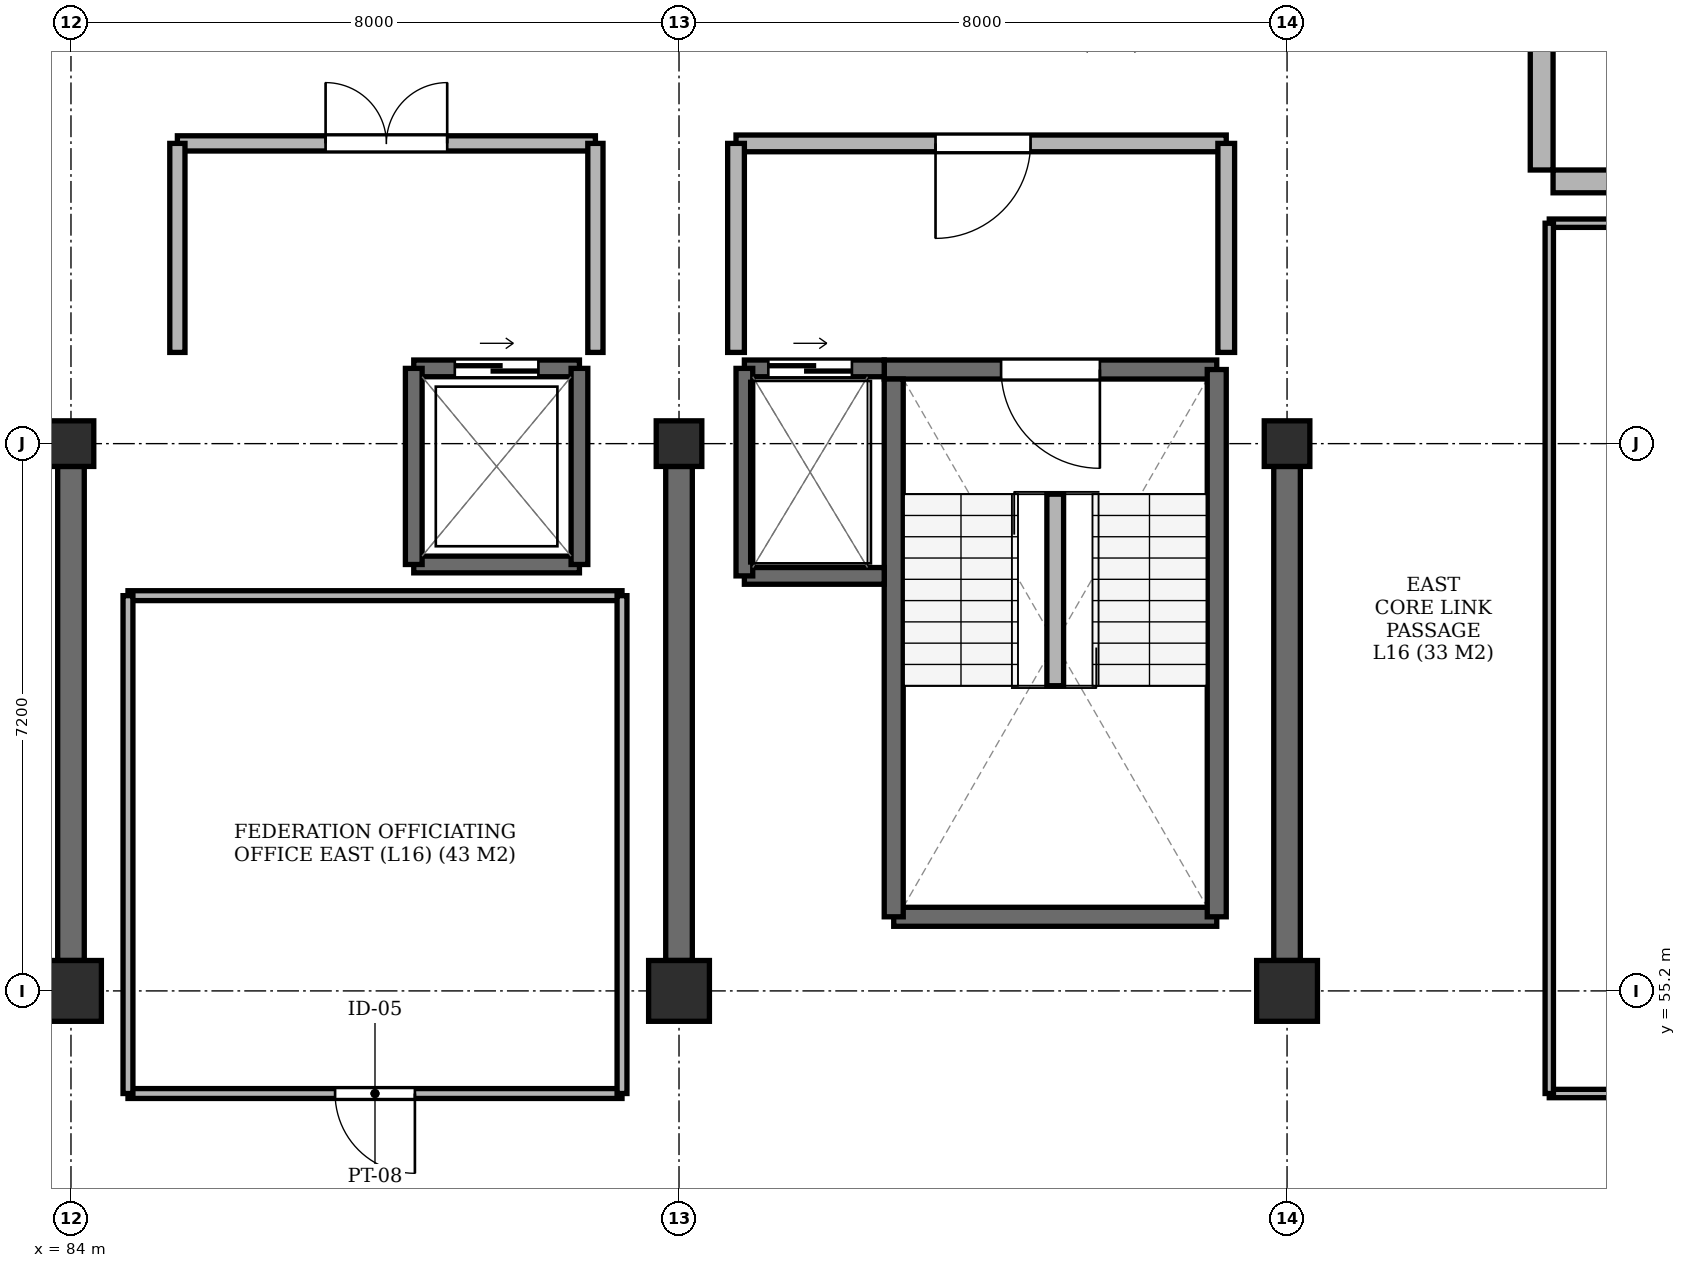
"""IFC4 building model, lengths in metres.
Left out: names, types, materials, properties, quantities, classifications, styles, units other than length and angle.
Written with IfcOpenShell. Run it as: python <this file> out.ifc"""

import sys

from ifc_helpers import new_model, si_unit, direction, frame, frame_2d, origin, origin_2d, place, context, subcontext, project, spatial, rectangle, extrude, element, fill, save


model = new_model("IFC4")
c1 = context("Model", 3, precision=1e-05, world=origin(), true_north=direction((0.0, 1.0)))
c2 = subcontext(c1, "Body", "Model", "MODEL_VIEW")
j1 = project(units=[si_unit("LENGTHUNIT", "METRE"), si_unit("PLANEANGLEUNIT", "RADIAN")], contexts=[c1])
p1 = place(None, origin())
s1 = spatial("IfcSite", under=j1, at=p1, CompositionType="ELEMENT")
p2 = place(p1, origin())
s2 = spatial("IfcBuilding", under=s1, at=p2, CompositionType="ELEMENT")
p3 = place(p2, frame((0.0, 0.0, 63.3)))
s3 = spatial("IfcBuildingStorey", under=s2, at=p3, CompositionType="ELEMENT", Elevation=63.3)
p4 = place(p3, frame((84.0, 55.2, -0.21), z_axis=(0.0, 0.0, 1.0), x_axis=(1.0, 0.0, 0.0)))
e1 = element("IfcColumn", 1, at=p4, inside=s3, PredefinedType="COLUMN", context=c2, shape_type="SweptSolid", body=[
    extrude(rectangle(XDim=0.8, YDim=0.8, at=origin_2d()), origin(), (0.0, 0.0, 1.0), 3.22),
])
p5 = place(p3, frame((84.0, 62.4, -0.21), z_axis=(0.0, 0.0, 1.0), x_axis=(1.0, 0.0, 0.0)))
e2 = element("IfcColumn", 2, at=p5, inside=s3, PredefinedType="COLUMN", context=c2, shape_type="SweptSolid", body=[
    extrude(rectangle(XDim=0.6, YDim=0.6, at=origin_2d()), origin(), (0.0, 0.0, 1.0), 3.22),
])
p6 = place(p3, frame((92.0, 55.2, -0.21), z_axis=(0.0, 0.0, 1.0), x_axis=(1.0, 0.0, 0.0)))
e3 = element("IfcColumn", 3, at=p6, inside=s3, PredefinedType="COLUMN", context=c2, shape_type="SweptSolid", body=[
    extrude(rectangle(XDim=0.8, YDim=0.8, at=origin_2d()), origin(), (0.0, 0.0, 1.0), 3.22),
])
p7 = place(p3, frame((92.0, 62.4, -0.21), z_axis=(0.0, 0.0, 1.0), x_axis=(1.0, 0.0, 0.0)))
e4 = element("IfcColumn", 4, at=p7, inside=s3, PredefinedType="COLUMN", context=c2, shape_type="SweptSolid", body=[
    extrude(rectangle(XDim=0.6, YDim=0.6, at=origin_2d()), origin(), (0.0, 0.0, 1.0), 3.22),
])
p8 = place(p3, frame((100.0, 55.2, -0.21), z_axis=(0.0, 0.0, 1.0), x_axis=(1.0, 0.0, 0.0)))
e5 = element("IfcColumn", 5, at=p8, inside=s3, PredefinedType="COLUMN", context=c2, shape_type="SweptSolid", body=[
    extrude(rectangle(XDim=0.8, YDim=0.8, at=origin_2d()), origin(), (0.0, 0.0, 1.0), 3.22),
])
p9 = place(p3, frame((100.0, 62.4, -0.21), z_axis=(0.0, 0.0, 1.0), x_axis=(1.0, 0.0, 0.0)))
e6 = element("IfcColumn", 6, at=p9, inside=s3, PredefinedType="COLUMN", context=c2, shape_type="SweptSolid", body=[
    extrude(rectangle(XDim=0.6, YDim=0.6, at=origin_2d()), origin(), (0.0, 0.0, 1.0), 3.22),
])
for number, where, z_axis, x_axis in (
    (7, (84.0, 55.6, 0.0), (0.0, 0.0, 1.0), (0.0, 1.0, 0.0)),
    (8, (92.0, 55.6, 0.0), (0.0, 0.0, 1.0), (0.0, 1.0, 0.0)),
    (9, (100.0, 55.6, 0.0), (0.0, 0.0, 1.0), (0.0, 1.0, 0.0)),
):
    element("IfcWall", number, at=place(p3, frame(where, z_axis=z_axis, x_axis=x_axis)), inside=s3, PredefinedType="SHEAR", context=c2, shape_type="SweptSolid", body=[
        extrude(rectangle(XDim=6.5, YDim=0.35, at=frame_2d((3.25, 0.0))), origin(), (0.0, 0.0, 1.0), 3.01),
    ])
p10 = place(p3, frame((108.0, 65.85, 0.0), z_axis=(0.0, 0.0, 1.0), x_axis=(-1.0, 0.0, 0.0)))
e10 = element("IfcWall", 10, at=p10, inside=s3, PredefinedType="SOLIDWALL", context=c2, shape_type="SweptSolid", body=[
    extrude(rectangle(XDim=4.5, YDim=0.3, at=frame_2d((2.25, 0.0))), origin(), (0.0, 0.0, 1.0), 2.53),
])
p11 = place(p10, frame((1.625, 0.0, 0.62)))
e11 = element("IfcOpeningElement", 11, at=p11, cuts=e10, PredefinedType="OPENING", context=c2, shape_type="SweptSolid", body=[
    extrude(rectangle(XDim=1.25, YDim=1.75, at=frame_2d((0.625, 0.875))), frame((0.0, 0.162, 0.0), z_axis=(0.0, -1.0, 0.0), x_axis=(1.0, 0.0, 0.0)), (0.0, 0.0, 1.0), 0.324),
])
p12 = place(p3, frame((103.35, 66.0, 0.0), z_axis=(0.0, 0.0, 1.0), x_axis=(0.0, 1.0, 0.0)))
e12 = element("IfcWall", 12, at=p12, inside=s3, PredefinedType="SOLIDWALL", context=c2, shape_type="SweptSolid", body=[
    extrude(rectangle(XDim=3.6, YDim=0.3, at=frame_2d((1.8, 0.0))), origin(), (0.0, 0.0, 1.0), 2.53),
])
p13 = place(p3, frame((94.825, 56.175, 0.0), z_axis=(0.0, 0.0, 1.0), x_axis=(1.0, 0.0, 0.0)))
e13 = element("IfcWall", 13, at=p13, inside=s3, PredefinedType="SHEAR", context=c2, shape_type="SweptSolid", body=[
    extrude(rectangle(XDim=4.25, YDim=0.25, at=frame_2d((2.125, 0.0))), origin(), (0.0, 0.0, 1.0), 3.01),
])
p14 = place(p3, frame((99.075, 63.375, 0.0), z_axis=(0.0, 0.0, 1.0), x_axis=(-1.0, 0.0, 0.0)))
e14 = element("IfcWall", 14, at=p14, inside=s3, PredefinedType="SHEAR", context=c2, shape_type="SweptSolid", body=[
    extrude(rectangle(XDim=4.375, YDim=0.25, at=frame_2d((2.188, 0.0))), origin(), (0.0, 0.0, 1.0), 3.01),
])
p15 = place(p14, frame((1.538, 0.0, 0.0)))
e15 = element("IfcOpeningElement", 15, at=p15, cuts=e14, PredefinedType="OPENING", context=c2, shape_type="SweptSolid", body=[
    extrude(rectangle(XDim=1.3, YDim=2.2, at=frame_2d((0.65, 1.1))), frame((0.0, 0.137, 0.0), z_axis=(0.0, -1.0, 0.0), x_axis=(1.0, 0.0, 0.0)), (0.0, 0.0, 1.0), 0.274),
])
p16 = place(p3, frame((94.825, 63.25, 0.0), z_axis=(0.0, 0.0, 1.0), x_axis=(0.0, -1.0, 0.0)))
e16 = element("IfcWall", 16, at=p16, inside=s3, PredefinedType="SHEAR", context=c2, shape_type="SweptSolid", body=[
    extrude(rectangle(XDim=7.075, YDim=0.25, at=frame_2d((3.538, 0.0))), origin(), (0.0, 0.0, 1.0), 3.01),
])
p17 = place(p3, frame((99.075, 56.175, 0.0), z_axis=(0.0, 0.0, 1.0), x_axis=(0.0, 1.0, 0.0)))
e17 = element("IfcWall", 17, at=p17, inside=s3, PredefinedType="SHEAR", context=c2, shape_type="SweptSolid", body=[
    extrude(rectangle(XDim=7.2, YDim=0.25, at=frame_2d((3.6, 0.0))), origin(), (0.0, 0.0, 1.0), 3.01),
])
p18 = place(p3, frame((96.95, 59.215, 0.0), z_axis=(0.0, 0.0, 1.0), x_axis=(0.0, 1.0, 0.0)))
e18 = element("IfcWall", 18, at=p18, inside=s3, PredefinedType="PARTITIONING", context=c2, shape_type="SweptSolid", body=[
    extrude(rectangle(XDim=2.52, YDim=0.22, at=frame_2d((1.26, 0.0))), origin(), (0.0, 0.0, 1.0), 3.01),
])
p19 = place(p3, frame((92.86, 60.66, 0.0), z_axis=(0.0, 0.0, 1.0), x_axis=(1.0, 0.0, 0.0)))
e19 = element("IfcWall", 19, at=p19, inside=s3, PredefinedType="SHEAR", context=c2, shape_type="SweptSolid", body=[
    extrude(rectangle(XDim=1.84, YDim=0.22, at=frame_2d((0.92, 0.0))), origin(), (0.0, 0.0, 1.0), 3.01),
])
p20 = place(p3, frame((94.7, 63.39, 0.0), z_axis=(0.0, 0.0, 1.0), x_axis=(-1.0, 0.0, 0.0)))
e20 = element("IfcWall", 20, at=p20, inside=s3, PredefinedType="SHEAR", context=c2, shape_type="SweptSolid", body=[
    extrude(rectangle(XDim=1.84, YDim=0.22, at=frame_2d((0.92, 0.0))), origin(), (0.0, 0.0, 1.0), 3.01),
])
p21 = place(p20, frame((0.425, 0.0, 0.0)))
e21 = element("IfcOpeningElement", 21, at=p21, cuts=e20, PredefinedType="OPENING", context=c2, shape_type="SweptSolid", body=[
    extrude(rectangle(XDim=1.1, YDim=2.2, at=frame_2d((0.55, 1.1))), frame((0.0, 0.122, 0.0), z_axis=(0.0, -1.0, 0.0), x_axis=(1.0, 0.0, 0.0)), (0.0, 0.0, 1.0), 0.244),
])
p22 = place(p3, frame((92.86, 63.39, 0.0), z_axis=(0.0, 0.0, 1.0), x_axis=(0.0, -1.0, 0.0)))
e22 = element("IfcWall", 22, at=p22, inside=s3, PredefinedType="SHEAR", context=c2, shape_type="SweptSolid", body=[
    extrude(rectangle(XDim=2.73, YDim=0.22, at=frame_2d((1.365, 0.0))), origin(), (0.0, 0.0, 1.0), 3.01),
])
p23 = place(p3, frame((88.51, 60.81, 0.0), z_axis=(0.0, 0.0, 1.0), x_axis=(1.0, 0.0, 0.0)))
e23 = element("IfcWall", 23, at=p23, inside=s3, PredefinedType="SHEAR", context=c2, shape_type="SweptSolid", body=[
    extrude(rectangle(XDim=2.18, YDim=0.22, at=frame_2d((1.09, 0.0))), origin(), (0.0, 0.0, 1.0), 3.01),
])
p24 = place(p3, frame((90.69, 63.39, 0.0), z_axis=(0.0, 0.0, 1.0), x_axis=(-1.0, 0.0, 0.0)))
e24 = element("IfcWall", 24, at=p24, inside=s3, PredefinedType="SHEAR", context=c2, shape_type="SweptSolid", body=[
    extrude(rectangle(XDim=2.18, YDim=0.22, at=frame_2d((1.09, 0.0))), origin(), (0.0, 0.0, 1.0), 3.01),
])
p25 = place(p24, frame((0.54, 0.0, 0.0)))
e25 = element("IfcOpeningElement", 25, at=p25, cuts=e24, PredefinedType="OPENING", context=c2, shape_type="SweptSolid", body=[
    extrude(rectangle(XDim=1.1, YDim=2.2, at=frame_2d((0.55, 1.1))), frame((0.0, 0.122, 0.0), z_axis=(0.0, -1.0, 0.0), x_axis=(1.0, 0.0, 0.0)), (0.0, 0.0, 1.0), 0.244),
])
for number, where, z_axis, x_axis in (
    (26, (88.51, 63.39, 0.0), (0.0, 0.0, 1.0), (0.0, -1.0, 0.0)),
    (27, (90.69, 60.81, 0.0), (0.0, 0.0, 1.0), (0.0, 1.0, 0.0)),
):
    element("IfcWall", number, at=place(p3, frame(where, z_axis=z_axis, x_axis=x_axis)), inside=s3, PredefinedType="SHEAR", context=c2, shape_type="SweptSolid", body=[
        extrude(rectangle(XDim=2.58, YDim=0.22, at=frame_2d((1.29, 0.0))), origin(), (0.0, 0.0, 1.0), 3.01),
    ])
p26 = place(p3, frame((92.75, 66.35, 0.0), z_axis=(0.0, 0.0, 1.0), x_axis=(1.0, 0.0, 0.0)))
e28 = element("IfcWall", 28, at=p26, inside=s3, PredefinedType="PARTITIONING", context=c2, shape_type="SweptSolid", body=[
    extrude(rectangle(XDim=6.45, YDim=0.22, at=frame_2d((3.225, 0.0))), origin(), (0.0, 0.0, 1.0), 2.53),
])
p27 = place(p26, frame((2.625, 0.0, 0.0)))
e29 = element("IfcOpeningElement", 29, at=p27, cuts=e28, PredefinedType="OPENING", context=c2, shape_type="SweptSolid", body=[
    extrude(rectangle(XDim=1.25, YDim=2.2, at=frame_2d((0.625, 1.1))), frame((0.0, 0.122, 0.0), z_axis=(0.0, -1.0, 0.0), x_axis=(1.0, 0.0, 0.0)), (0.0, 0.0, 1.0), 0.244),
])
for number, where, z_axis, x_axis in (
    (30, (92.75, 63.6, 0.0), (0.0, 0.0, 1.0), (0.0, 1.0, 0.0)),
    (31, (99.2, 63.6, 0.0), (0.0, 0.0, 1.0), (0.0, 1.0, 0.0)),
):
    element("IfcWall", number, at=place(p3, frame(where, z_axis=z_axis, x_axis=x_axis)), inside=s3, PredefinedType="PARTITIONING", context=c2, shape_type="SweptSolid", body=[
        extrude(rectangle(XDim=2.75, YDim=0.22, at=frame_2d((1.375, 0.0))), origin(), (0.0, 0.0, 1.0), 2.53),
    ])
p28 = place(p3, frame((85.4, 66.35, 0.0), z_axis=(0.0, 0.0, 1.0), x_axis=(1.0, 0.0, 0.0)))
e32 = element("IfcWall", 32, at=p28, inside=s3, PredefinedType="PARTITIONING", context=c2, shape_type="SweptSolid", body=[
    extrude(rectangle(XDim=5.5, YDim=0.2, at=frame_2d((2.75, 0.0))), origin(), (0.0, 0.0, 1.0), 2.53),
])
p29 = place(p28, frame((1.95, 0.0, 0.0)))
e33 = element("IfcOpeningElement", 33, at=p29, cuts=e32, PredefinedType="OPENING", context=c2, shape_type="SweptSolid", body=[
    extrude(rectangle(XDim=1.6, YDim=2.2, at=frame_2d((0.8, 1.1))), frame((0.0, 0.112, 0.0), z_axis=(0.0, -1.0, 0.0), x_axis=(1.0, 0.0, 0.0)), (0.0, 0.0, 1.0), 0.224),
])
for number, where, z_axis, x_axis in (
    (34, (85.4, 63.6, 0.0), (0.0, 0.0, 1.0), (0.0, 1.0, 0.0)),
    (35, (90.9, 63.6, 0.0), (0.0, 0.0, 1.0), (0.0, 1.0, 0.0)),
):
    element("IfcWall", number, at=place(p3, frame(where, z_axis=z_axis, x_axis=x_axis)), inside=s3, PredefinedType="PARTITIONING", context=c2, shape_type="SweptSolid", body=[
        extrude(rectangle(XDim=2.75, YDim=0.2, at=frame_2d((1.375, 0.0))), origin(), (0.0, 0.0, 1.0), 2.53),
    ])
p30 = place(p3, frame((103.45, 53.85, 0.0), z_axis=(0.0, 0.0, 1.0), x_axis=(1.0, 0.0, 0.0)))
e36 = element("IfcWall", 36, at=p30, inside=s3, PredefinedType="PARTITIONING", context=c2, shape_type="SweptSolid", body=[
    extrude(rectangle(XDim=3.75, YDim=0.11, at=frame_2d((1.875, 0.0))), origin(), (0.0, 0.0, 1.0), 2.53),
])
p31 = place(p30, frame((1.3, 0.0, 0.0)))
e37 = element("IfcOpeningElement", 37, at=p31, cuts=e36, PredefinedType="OPENING", context=c2, shape_type="SweptSolid", body=[
    extrude(rectangle(XDim=1.1, YDim=2.15, at=frame_2d((0.55, 1.075))), frame((0.0, 0.067, 0.0), z_axis=(0.0, -1.0, 0.0), x_axis=(1.0, 0.0, 0.0)), (0.0, 0.0, 1.0), 0.134),
])
p32 = place(p3, frame((103.45, 65.3, 0.0), z_axis=(0.0, 0.0, 1.0), x_axis=(1.0, 0.0, 0.0)))
e38 = element("IfcWall", 38, at=p32, inside=s3, PredefinedType="PARTITIONING", context=c2, shape_type="SweptSolid", body=[
    extrude(rectangle(XDim=3.75, YDim=0.11, at=frame_2d((1.875, 0.0))), origin(), (0.0, 0.0, 1.0), 2.53),
])
p33 = place(p3, frame((103.45, 53.85, 0.0), z_axis=(0.0, 0.0, 1.0), x_axis=(0.0, 1.0, 0.0)))
e39 = element("IfcWall", 39, at=p33, inside=s3, PredefinedType="PARTITIONING", context=c2, shape_type="SweptSolid", body=[
    extrude(rectangle(XDim=11.45, YDim=0.11, at=frame_2d((5.725, 0.0))), origin(), (0.0, 0.0, 1.0), 2.53),
])
p34 = place(p3, frame((84.75, 53.85, 0.0), z_axis=(0.0, 0.0, 1.0), x_axis=(1.0, 0.0, 0.0)))
e40 = element("IfcWall", 40, at=p34, inside=s3, PredefinedType="PARTITIONING", context=c2, shape_type="SweptSolid", body=[
    extrude(rectangle(XDim=6.5, YDim=0.13, at=frame_2d((3.25, 0.0))), origin(), (0.0, 0.0, 1.0), 2.53),
])
p35 = place(p34, frame((2.725, 0.0, 0.0)))
e41 = element("IfcOpeningElement", 41, at=p35, cuts=e40, PredefinedType="OPENING", context=c2, shape_type="SweptSolid", body=[
    extrude(rectangle(XDim=1.05, YDim=2.15, at=frame_2d((0.525, 1.075))), frame((0.0, 0.077, 0.0), z_axis=(0.0, -1.0, 0.0), x_axis=(1.0, 0.0, 0.0)), (0.0, 0.0, 1.0), 0.154),
])
p36 = place(p3, frame((84.75, 60.4, 0.0), z_axis=(0.0, 0.0, 1.0), x_axis=(1.0, 0.0, 0.0)))
e42 = element("IfcWall", 42, at=p36, inside=s3, PredefinedType="PARTITIONING", context=c2, shape_type="SweptSolid", body=[
    extrude(rectangle(XDim=6.5, YDim=0.13, at=frame_2d((3.25, 0.0))), origin(), (0.0, 0.0, 1.0), 2.53),
])
for number, where, z_axis, x_axis in (
    (43, (84.75, 53.85, 0.0), (0.0, 0.0, 1.0), (0.0, 1.0, 0.0)),
    (44, (91.25, 53.85, 0.0), (0.0, 0.0, 1.0), (0.0, 1.0, 0.0)),
):
    element("IfcWall", number, at=place(p3, frame(where, z_axis=z_axis, x_axis=x_axis)), inside=s3, PredefinedType="PARTITIONING", context=c2, shape_type="SweptSolid", body=[
        extrude(rectangle(XDim=6.55, YDim=0.13, at=frame_2d((3.275, 0.0))), origin(), (0.0, 0.0, 1.0), 2.53),
    ])
p37 = place(p15, origin())
e45 = element("IfcDoor", 45, at=p37, inside=s3, OperationType="SINGLE_SWING_LEFT", PredefinedType="DOOR", context=c2, shape_type="SweptSolid", body=[
    extrude(rectangle(XDim=1.3, YDim=2.2, at=frame_2d((0.65, 1.1))), frame((0.0, 0.025, 0.0), z_axis=(0.0, -1.0, 0.0), x_axis=(1.0, 0.0, 0.0)), (0.0, 0.0, 1.0), 0.05),
])
fill(e15, e45)
p38 = place(p21, origin())
e46 = element("IfcDoor", 46, at=p38, inside=s3, OperationType="SLIDING_TO_LEFT", PredefinedType="DOOR", context=c2, shape_type="SweptSolid", body=[
    extrude(rectangle(XDim=1.1, YDim=2.2, at=frame_2d((0.55, 1.1))), frame((0.0, 0.025, 0.0), z_axis=(0.0, -1.0, 0.0), x_axis=(1.0, 0.0, 0.0)), (0.0, 0.0, 1.0), 0.05),
])
fill(e21, e46)
p39 = place(p25, origin())
e47 = element("IfcDoor", 47, at=p39, inside=s3, OperationType="SLIDING_TO_LEFT", PredefinedType="DOOR", context=c2, shape_type="SweptSolid", body=[
    extrude(rectangle(XDim=1.1, YDim=2.2, at=frame_2d((0.55, 1.1))), frame((0.0, 0.025, 0.0), z_axis=(0.0, -1.0, 0.0), x_axis=(1.0, 0.0, 0.0)), (0.0, 0.0, 1.0), 0.05),
])
fill(e25, e47)
p40 = place(p27, frame((1.25, 0.0, 0.0), z_axis=(0.0, 0.0, 1.0), x_axis=(-1.0, 0.0, 0.0)))
e48 = element("IfcDoor", 48, at=p40, inside=s3, OperationType="SINGLE_SWING_LEFT", PredefinedType="DOOR", context=c2, shape_type="SweptSolid", body=[
    extrude(rectangle(XDim=1.25, YDim=2.2, at=frame_2d((0.625, 1.1))), frame((0.0, 0.025, 0.0), z_axis=(0.0, -1.0, 0.0), x_axis=(1.0, 0.0, 0.0)), (0.0, 0.0, 1.0), 0.05),
])
fill(e29, e48)
p41 = place(p29, origin())
e49 = element("IfcDoor", 49, at=p41, inside=s3, OperationType="DOUBLE_DOOR_SINGLE_SWING", PredefinedType="DOOR", context=c2, shape_type="SweptSolid", body=[
    extrude(rectangle(XDim=1.6, YDim=2.2, at=frame_2d((0.8, 1.1))), frame((0.0, 0.025, 0.0), z_axis=(0.0, -1.0, 0.0), x_axis=(1.0, 0.0, 0.0)), (0.0, 0.0, 1.0), 0.05),
])
fill(e33, e49)
p42 = place(p35, frame((1.05, 0.0, 0.0), z_axis=(0.0, 0.0, 1.0), x_axis=(-1.0, 0.0, 0.0)))
e50 = element("IfcDoor", 50, at=p42, inside=s3, OperationType="SINGLE_SWING_RIGHT", PredefinedType="DOOR", context=c2, shape_type="SweptSolid", body=[
    extrude(rectangle(XDim=1.05, YDim=2.15, at=frame_2d((0.525, 1.075))), frame((0.0, 0.025, 0.0), z_axis=(0.0, -1.0, 0.0), x_axis=(1.0, 0.0, 0.0)), (0.0, 0.0, 1.0), 0.05),
])
fill(e41, e50)
save(model, sys.argv[1])
